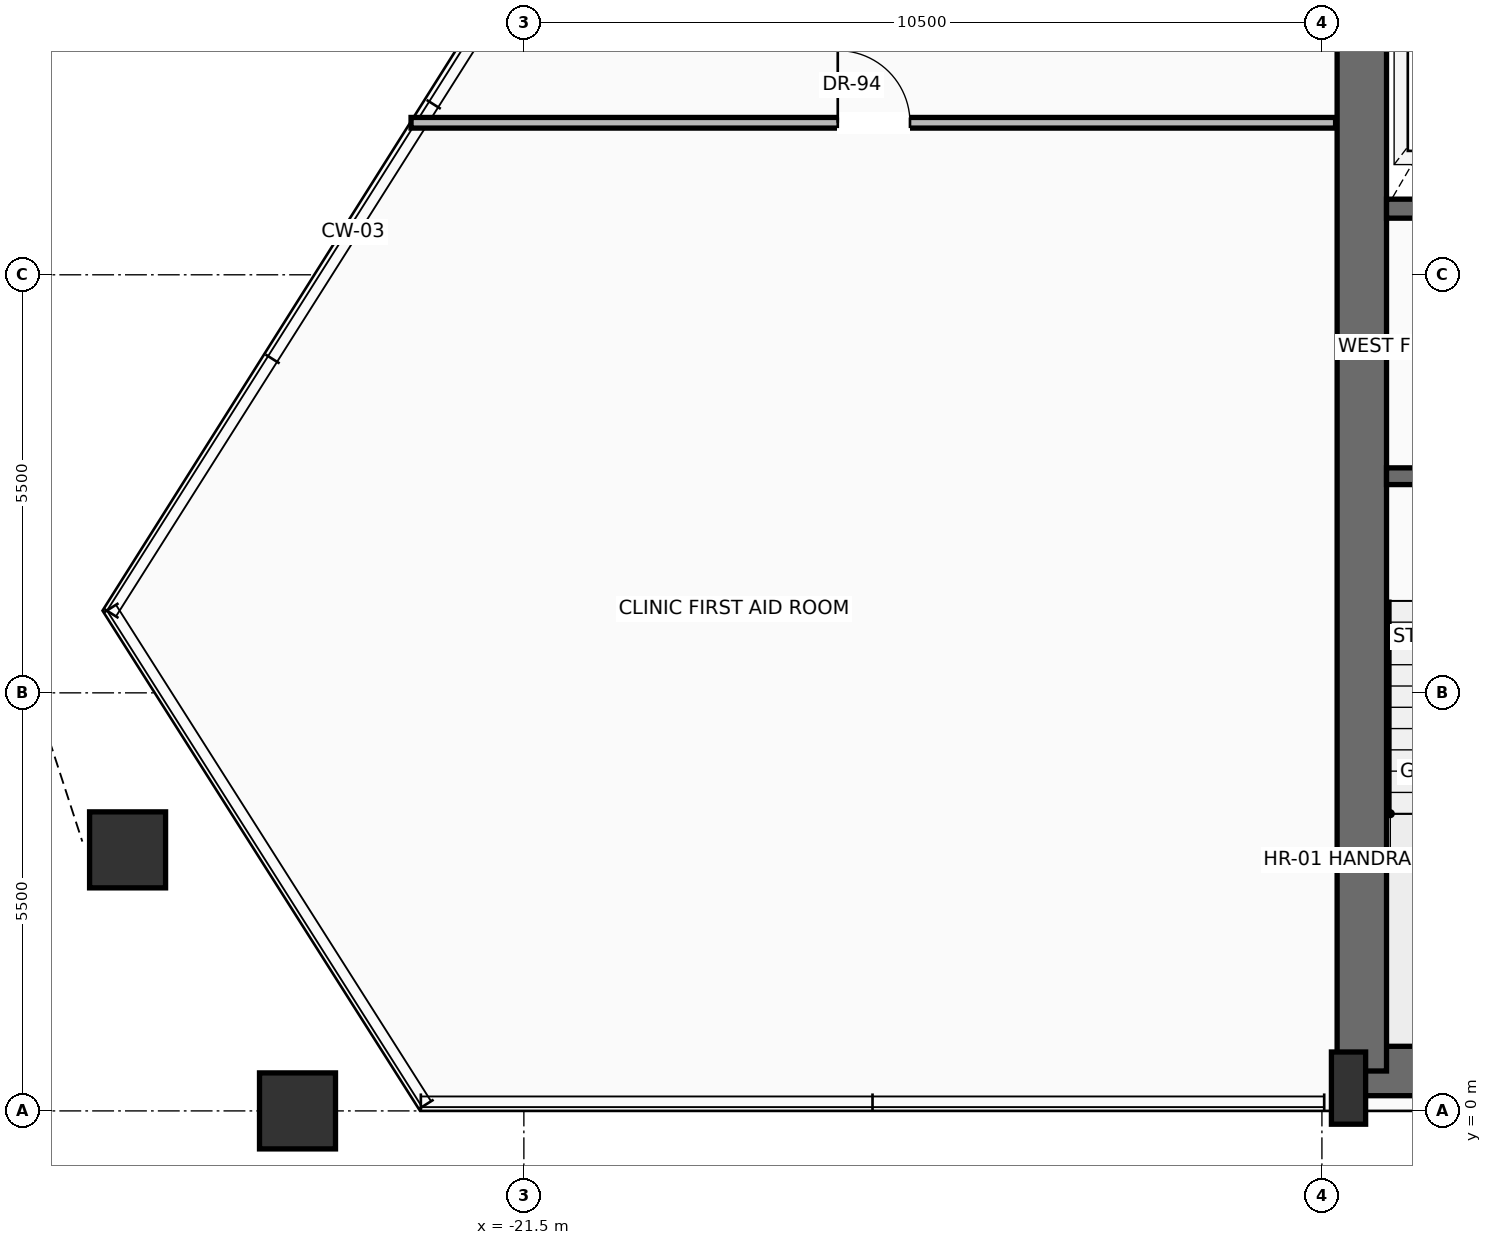
"""IFC4 building model, lengths in metres.
Left out: names, types, materials, properties, quantities, classifications, styles, units other than length and angle.
Written with IfcOpenShell. Run it as: python <this file> out.ifc"""

import sys

from ifc_helpers import new_model, si_unit, direction, frame, frame_2d, origin, origin_2d, place, context, subcontext, project, spatial, rectangle, hollow_rectangle, extrude, source, transform, mapped, element, fill, save


model = new_model("IFC4")
c1 = context("Model", 3, precision=1e-05, world=origin(), true_north=direction((0.0, 1.0)))
c2 = subcontext(c1, "Body", "Model", "MODEL_VIEW")
j1 = project(units=[si_unit("LENGTHUNIT", "METRE"), si_unit("PLANEANGLEUNIT", "RADIAN")], contexts=[c1])
p1 = place(None, origin())
s1 = spatial("IfcSite", under=j1, at=p1, CompositionType="ELEMENT")
p2 = place(p1, origin())
s2 = spatial("IfcBuilding", under=s1, at=p2, CompositionType="ELEMENT")
p3 = place(p2, frame((0.0, 0.0, 171.0)))
s3 = spatial("IfcBuildingStorey", under=s2, at=p3, CompositionType="ELEMENT", Elevation=171.0)
p4 = place(p3, frame((-10.65, 0.525, 0.0), z_axis=(0.0, 0.0, 1.0), x_axis=(1.0, 0.0, 0.0)))
e1 = element("IfcWall", 1, at=p4, inside=s3, PredefinedType="SHEAR", context=c2, shape_type="SweptSolid", body=[
    extrude(rectangle(XDim=21.3, YDim=0.65, at=frame_2d((10.65, 0.0))), origin(), (0.0, 0.0, 1.0), 3.47),
])
p5 = place(p3, frame((-10.475, 0.525, 0.0), z_axis=(0.0, 0.0, 1.0), x_axis=(0.0, 1.0, 0.0)))
e2 = element("IfcWall", 2, at=p5, inside=s3, PredefinedType="SHEAR", context=c2, shape_type="SweptSolid", body=[
    extrude(rectangle(XDim=15.55, YDim=0.65, at=frame_2d((7.775, 0.0))), origin(), (0.0, 0.0, 1.0), 3.47),
])
m1 = source(origin(), c2, "Body", "SweptSolid", [
    extrude(rectangle(XDim=0.45, YDim=0.95, at=origin_2d()), origin(), (0.0, 0.0, 1.0), 3.7),
])
p6 = place(p3, frame((-10.65, 0.3, 0.0), z_axis=(0.0, 0.0, 1.0), x_axis=(1.0, 0.0, 0.0)))
e3 = element("IfcColumn", 3, at=p6, inside=s3, PredefinedType="PILASTER", context=c2, shape_type="MappedRepresentation", body=[
    mapped(m1, transform((0.0, 0.0, 0.0), scale=1.0)),
])
m2 = source(origin(), c2, "Body", "SweptSolid", [
    extrude(hollow_rectangle(XDim=1.0, YDim=1.0, WallThickness=0.05, at=origin_2d()), origin(), (0.0, 0.0, 1.0), 3.691),
])
p7 = place(p3, frame((-24.478, 0.0, 0.004), z_axis=(-0.008333595122, 0.0, 0.999965274993), x_axis=(0.0, -1.0, 0.0)))
e4 = element("IfcColumn", 4, at=p7, inside=s3, PredefinedType="COLUMN", context=c2, shape_type="MappedRepresentation", body=[
    mapped(m2, transform((0.0, 0.0, 0.0), scale=1.0)),
])
m3 = source(origin(), c2, "Body", "SweptSolid", [
    extrude(hollow_rectangle(XDim=1.0, YDim=1.0, WallThickness=0.05, at=origin_2d()), origin(), (0.0, 0.0, 1.0), 3.692),
])
p8 = place(p3, frame((-26.714, 3.434, 0.004), z_axis=(0.002050143979, -0.015673681385, 0.999875058506), x_axis=(0.991553687508, 0.129696895834, 0.0)))
e5 = element("IfcColumn", 5, at=p8, inside=s3, PredefinedType="COLUMN", context=c2, shape_type="MappedRepresentation", body=[
    mapped(m3, transform((0.0, 0.0, 0.0), scale=1.0)),
])
p9 = place(p3, frame((-5.5, 8.35, 0.0), z_axis=(0.0, 0.0, 1.0), x_axis=(-1.0, 0.0, 0.0)))
e6 = element("IfcWall", 6, at=p9, inside=s3, PredefinedType="SOLIDWALL", context=c2, shape_type="SweptSolid", body=[
    extrude(rectangle(XDim=4.65, YDim=0.22, at=frame_2d((2.325, 0.0))), origin(), (0.0, 0.0, 1.0), 3.47),
])
p10 = place(p9, frame((2.5, 0.0, 0.0)))
e7 = element("IfcOpeningElement", 7, at=p10, cuts=e6, PredefinedType="OPENING", context=c2, shape_type="SweptSolid", body=[
    extrude(rectangle(XDim=1.15, YDim=2.2, at=frame_2d((0.575, 1.1))), frame((0.0, 0.12, 0.0), z_axis=(0.0, -1.0, 0.0), x_axis=(1.0, 0.0, 0.0)), (0.0, 0.0, 1.0), 0.24),
])
p11 = place(p3, frame((-5.5, 11.87, 0.0), z_axis=(0.0, 0.0, 1.0), x_axis=(-1.0, 0.0, 0.0)))
e8 = element("IfcWall", 8, at=p11, inside=s3, PredefinedType="SOLIDWALL", context=c2, shape_type="SweptSolid", body=[
    extrude(rectangle(XDim=4.65, YDim=0.25, at=frame_2d((2.325, 0.0))), origin(), (0.0, 0.0, 1.0), 3.47),
])
p12 = place(p11, frame((2.95, 0.0, 0.0)))
e9 = element("IfcOpeningElement", 9, at=p12, cuts=e8, PredefinedType="OPENING", context=c2, shape_type="SweptSolid", body=[
    extrude(rectangle(XDim=1.2, YDim=2.25, at=frame_2d((0.6, 1.125))), frame((0.0, 0.135, 0.0), z_axis=(0.0, -1.0, 0.0), x_axis=(1.0, 0.0, 0.0)), (0.0, 0.0, 1.0), 0.27),
])
p13 = place(p3, frame((-22.984, 13.0, 0.0), z_axis=(0.0, 0.0, 1.0), x_axis=(1.0, 0.0, 0.0)))
e10 = element("IfcWall", 10, at=p13, inside=s3, PredefinedType="PARTITIONING", context=c2, shape_type="SweptSolid", body=[
    extrude(rectangle(XDim=12.164, YDim=0.14, at=frame_2d((6.082, 0.0))), origin(), (0.0, 0.0, 1.0), 3.462),
])
p14 = place(p13, frame((5.615, 0.0, 0.0)))
e11 = element("IfcOpeningElement", 11, at=p14, cuts=e10, PredefinedType="OPENING", context=c2, shape_type="SweptSolid", body=[
    extrude(rectangle(XDim=0.95, YDim=2.2, at=frame_2d((0.475, 1.1))), frame((0.0, 0.08, 0.0), z_axis=(0.0, -1.0, 0.0), x_axis=(1.0, 0.0, 0.0)), (0.0, 0.0, 1.0), 0.16),
])
m4 = source(origin(), c2, "Body", "SweptSolid", [
    extrude(rectangle(XDim=0.95, YDim=2.2, at=frame_2d((0.475, 1.1))), frame((0.0, 0.025, 0.0), z_axis=(0.0, -1.0, 0.0), x_axis=(1.0, 0.0, 0.0)), (0.0, 0.0, 1.0), 0.05),
])
p15 = place(p14, origin())
e12 = element("IfcDoor", 12, at=p15, inside=s3, OperationType="SINGLE_SWING_LEFT", PredefinedType="DOOR", context=c2, shape_type="MappedRepresentation", body=[
    mapped(m4, transform((0.0, 0.0, 0.0), scale=1.0)),
])
fill(e11, e12)
save(model, sys.argv[1])
